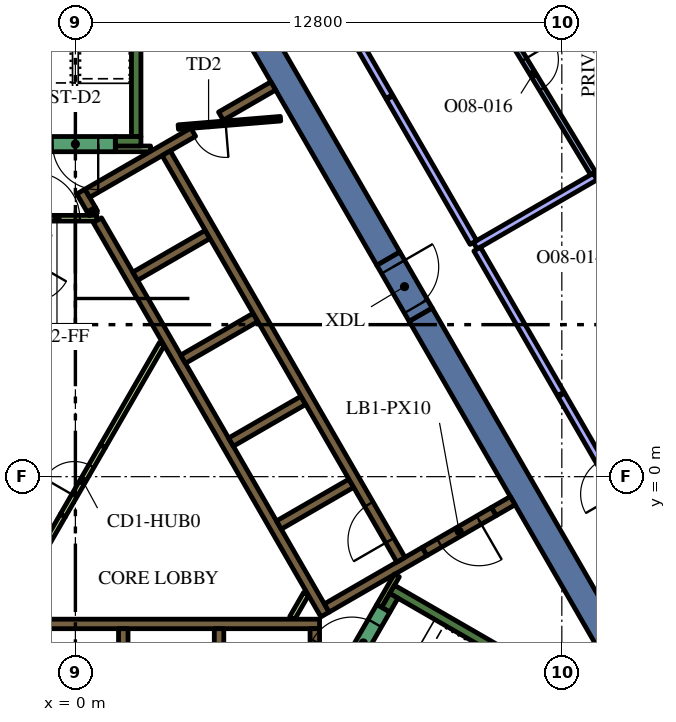
"""IFC4 building model, lengths in metres.
Left out: names, types, materials, properties, quantities, classifications, styles, units other than length and angle.
Written with IfcOpenShell. Run it as: python <this file> out.ifc"""

import sys

from ifc_helpers import new_model, si_unit, direction, frame, frame_2d, origin, place, context, subcontext, project, spatial, rectangle, extrude, element, fill, save


model = new_model("IFC4")
c1 = context("Model", 3, precision=1e-05, world=origin(), true_north=direction((0.0, 1.0)))
c2 = subcontext(c1, "Body", "Model", "MODEL_VIEW")
j1 = project(units=[si_unit("LENGTHUNIT", "METRE"), si_unit("PLANEANGLEUNIT", "RADIAN")], contexts=[c1])
p1 = place(None, origin())
s1 = spatial("IfcSite", under=j1, at=p1, CompositionType="ELEMENT")
p2 = place(p1, origin())
s2 = spatial("IfcBuilding", under=s1, at=p2, CompositionType="ELEMENT")
p3 = place(p2, frame((0.0, 0.0, 231.0)))
s3 = spatial("IfcBuildingStorey", under=s2, at=p3, CompositionType="ELEMENT", Elevation=231.0)
for number, where, z_axis, x_axis in (
    (1, (9.085, 4.264, 0.0), (0.0, 0.0, 1.0), (0.5, -0.866, 0.0)),
    (2, (8.235, 5.736, 0.0), (0.0, 0.0, 1.0), (-0.5, 0.866, 0.0)),
):
    element("IfcWall", number, at=place(p3, frame(where, z_axis=z_axis, x_axis=x_axis)), inside=s3, PredefinedType="SOLIDWALL", context=c2, shape_type="SweptSolid", body=[
        extrude(rectangle(XDim=12.472, YDim=0.7, at=frame_2d((6.236, 0.0))), origin(), (0.0, 0.0, 1.0), 4.2),
    ])
p4 = place(p3, frame((8.334, -2.964, 0.0), z_axis=(0.0, 0.0, 1.0), x_axis=(0.866016039709, -0.500016218704, 0.0)))
e3 = element("IfcWall", 3, at=p4, inside=s3, PredefinedType="SOLIDWALL", context=c2, shape_type="SweptSolid", body=[
    extrude(rectangle(XDim=7.05, YDim=0.25, at=frame_2d((3.525, 0.0))), origin(), (0.0, 0.0, 1.0), 4.2),
])
p5 = place(p3, frame((8.168, -3.503, 0.0), z_axis=(0.0, 0.0, 1.0), x_axis=(0.49972245349, 0.866185586049, 0.0)))
e4 = element("IfcWall", 4, at=p5, inside=s3, PredefinedType="SOLIDWALL", context=c2, shape_type="SweptSolid", body=[
    extrude(rectangle(XDim=0.425, YDim=0.25, at=frame_2d((0.212, 0.0))), origin(), (0.0, 0.0, 1.0), 4.2),
])
p6 = place(p3, frame((1.6, 8.95, 0.0), z_axis=(0.0, 0.0, 1.0), x_axis=(0.0, 1.0, 0.0)))
e5 = element("IfcWall", 5, at=p6, inside=s3, PredefinedType="SOLIDWALL", context=c2, shape_type="SweptSolid", body=[
    extrude(rectangle(XDim=6.8, YDim=0.25, at=frame_2d((3.4, 0.0))), origin(), (0.0, 0.0, 1.0), 4.2),
])
p7 = place(p3, frame((1.05, 8.825, 0.0), z_axis=(0.0, 0.0, 1.0), x_axis=(1.0, 0.0, 0.0)))
e6 = element("IfcWall", 6, at=p7, inside=s3, PredefinedType="SOLIDWALL", context=c2, shape_type="SweptSolid", body=[
    extrude(rectangle(XDim=0.675, YDim=0.25, at=frame_2d((0.337, 0.0))), origin(), (0.0, 0.0, 1.0), 4.2),
])
p8 = place(p3, frame((-5.545, -3.875, 0.0), z_axis=(0.0, 0.0, 1.0), x_axis=(1.0, 0.0, 0.0)))
e7 = element("IfcWall", 7, at=p8, inside=s3, PredefinedType="SOLIDWALL", context=c2, shape_type="SweptSolid", body=[
    extrude(rectangle(XDim=11.97, YDim=0.25, at=frame_2d((5.985, 0.0))), origin(), (0.0, 0.0, 1.0), 4.2),
])
p9 = place(p3, frame((6.3, -7.24, 0.0), z_axis=(0.0, 0.0, 1.0), x_axis=(0.0, 1.0, 0.0)))
e8 = element("IfcWall", 8, at=p9, inside=s3, PredefinedType="SOLIDWALL", context=c2, shape_type="SweptSolid", body=[
    extrude(rectangle(XDim=3.24, YDim=0.25, at=frame_2d((1.62, 0.0))), origin(), (0.0, 0.0, 1.0), 4.2),
])
for number, where, z_axis, x_axis in (
    (9, (3.78, -4.0, 0.0), (0.0, 0.0, 1.0), (0.0, -1.0, 0.0)),
    (10, (1.26, -4.0, 0.0), (0.0, 0.0, 1.0), (0.0, -1.0, 0.0)),
):
    element("IfcWall", number, at=place(p3, frame(where, z_axis=z_axis, x_axis=x_axis)), inside=s3, PredefinedType="SOLIDWALL", context=c2, shape_type="SweptSolid", body=[
        extrude(rectangle(XDim=2.2, YDim=0.25, at=frame_2d((1.1, 0.0))), origin(), (0.0, 0.0, 1.0), 4.2),
    ])
p10 = place(p3, frame((11.507, -0.631, 0.0), z_axis=(0.0, 0.0, 1.0), x_axis=(-0.866093731455, -0.499881634324, 0.0)))
e11 = element("IfcWall", 11, at=p10, inside=s3, PredefinedType="SOLIDWALL", context=c2, shape_type="SweptSolid", body=[
    extrude(rectangle(XDim=0.575, YDim=0.25, at=frame_2d((0.288, 0.0))), origin(), (0.0, 0.0, 1.0), 4.2),
])
p11 = place(p3, frame((0.473, 6.93, 0.0), z_axis=(0.0, 0.0, 1.0), x_axis=(-0.49972245349, 0.866185586049, 0.0)))
e12 = element("IfcWall", 12, at=p11, inside=s3, PredefinedType="SOLIDWALL", context=c2, shape_type="SweptSolid", body=[
    extrude(rectangle(XDim=0.11, YDim=0.25, at=frame_2d((0.055, 0.0))), origin(), (0.0, 0.0, 1.0), 4.2),
])
p12 = place(p3, frame((6.568, -3.627, 0.0), z_axis=(0.0, 0.0, 1.0), x_axis=(-0.499999455981, 0.866025717874, 0.0)))
e13 = element("IfcWall", 13, at=p12, inside=s3, PredefinedType="SOLIDWALL", context=c2, shape_type="SweptSolid", body=[
    extrude(rectangle(XDim=11.978, YDim=0.25, at=frame_2d((5.989, 0.0))), origin(), (0.0, 0.0, 1.0), 4.2),
])
p13 = place(p3, frame((0.417, 7.027, 0.0), z_axis=(0.0, 0.0, 1.0), x_axis=(-0.500210807569, 0.865903659763, 0.0)))
e14 = element("IfcWall", 14, at=p13, inside=s3, PredefinedType="SOLIDWALL", context=c2, shape_type="SweptSolid", body=[
    extrude(rectangle(XDim=0.548, YDim=0.25, at=frame_2d((0.274, 0.0))), origin(), (0.0, 0.0, 1.0), 4.2),
])
p14 = place(p3, frame((3.1, 9.064, 0.0), z_axis=(0.0, 0.0, 1.0), x_axis=(-0.866030133475, -0.499991807846, 0.0)))
e15 = element("IfcWall", 15, at=p14, inside=s3, PredefinedType="SOLIDWALL", context=c2, shape_type="SweptSolid", body=[
    extrude(rectangle(XDim=3.217, YDim=0.25, at=frame_2d((1.608, 0.0))), origin(), (0.0, 0.0, 1.0), 4.2),
])
p15 = place(p3, frame((1.574, 5.274, 0.0), z_axis=(0.0, 0.0, 1.0), x_axis=(0.866028486751, 0.499994660107, 0.0)))
e16 = element("IfcWall", 16, at=p15, inside=s3, PredefinedType="SOLIDWALL", context=c2, shape_type="SweptSolid", body=[
    extrude(rectangle(XDim=2.2, YDim=0.25, at=frame_2d((1.1, 0.0))), origin(), (0.0, 0.0, 1.0), 4.2),
])
for number, where, z_axis, x_axis in (
    (17, (2.834, 3.091, 0.0), (0.0, 0.0, 1.0), (0.866, 0.5, 0.0)),
    (18, (4.094, 0.909, 0.0), (0.0, 0.0, 1.0), (0.866, 0.5, 0.0)),
    (19, (5.354, -1.274, 0.0), (0.0, 0.0, 1.0), (0.866, 0.5, 0.0)),
):
    element("IfcWall", number, at=place(p3, frame(where, z_axis=z_axis, x_axis=x_axis)), inside=s3, PredefinedType="SOLIDWALL", context=c2, shape_type="SweptSolid", body=[
        extrude(rectangle(XDim=2.2, YDim=0.25, at=frame_2d((1.1, 0.0))), origin(), (0.0, 0.0, 1.0), 4.2),
    ])
p16 = place(p3, frame((6.614, -3.456, 0.0), z_axis=(0.0, 0.0, 1.0), x_axis=(0.866032512851, 0.499987686533, 0.0)))
e20 = element("IfcWall", 20, at=p16, inside=s3, PredefinedType="SOLIDWALL", context=c2, shape_type="SweptSolid", body=[
    extrude(rectangle(XDim=2.975, YDim=0.25, at=frame_2d((1.487, 0.0))), origin(), (0.0, 0.0, 1.0), 4.2),
])
p17 = place(p3, frame((3.83, 9.486, 0.0), z_axis=(0.0, 0.0, 1.0), x_axis=(0.865986202621, 0.500067892261, 0.0)))
e21 = element("IfcWall", 21, at=p17, inside=s3, PredefinedType="SOLIDWALL", context=c2, shape_type="SweptSolid", body=[
    extrude(rectangle(XDim=1.591, YDim=0.25, at=frame_2d((0.795, 0.0))), origin(), (0.0, 0.0, 1.0), 4.2),
])
p18 = place(p3, frame((1.05, 8.625, 0.0), z_axis=(0.0, 0.0, 1.0), x_axis=(1.0, 0.0, 0.0)))
e22 = element("IfcWall", 22, at=p18, inside=s3, PredefinedType="PARTITIONING", context=c2, shape_type="SweptSolid", body=[
    extrude(rectangle(XDim=0.929, YDim=0.15, at=frame_2d((0.464, 0.0))), origin(), (0.0, 0.0, 1.0), 3.45),
])
p19 = place(p3, frame((8.459, -2.599, 0.0), z_axis=(0.0, 0.0, 1.0), x_axis=(-0.500041054325, -0.866001699761, 0.0)))
e23 = element("IfcWall", 23, at=p19, inside=s3, PredefinedType="PARTITIONING", context=c2, shape_type="SweptSolid", body=[
    extrude(rectangle(XDim=0.929, YDim=0.15, at=frame_2d((0.464, 0.0))), origin(), (0.0, 0.0, 1.0), 4.2),
])
p20 = place(p3, frame((5.705, -3.718, 0.0), z_axis=(0.0, 0.0, 1.0), x_axis=(0.499962090823, 0.866047289552, 0.0)))
e24 = element("IfcWall", 24, at=p20, inside=s3, PredefinedType="PARTITIONING", context=c2, shape_type="SweptSolid", body=[
    extrude(rectangle(XDim=0.735, YDim=0.15, at=frame_2d((0.367, 0.0))), origin(), (0.0, 0.0, 1.0), 3.45),
])
p21 = place(p3, frame((-1.887, -3.718, 0.0), z_axis=(0.0, 0.0, 1.0), x_axis=(0.500043732237, 0.866000153493, 0.0)))
e25 = element("IfcWall", 25, at=p21, inside=s3, PredefinedType="PARTITIONING", context=c2, shape_type="SweptSolid", body=[
    extrude(rectangle(XDim=3.114, YDim=0.15, at=frame_2d((1.557, 0.0))), origin(), (0.0, 0.0, 1.0), 3.45),
])
p22 = place(p3, frame((0.72, 0.797, 0.0), z_axis=(0.0, 0.0, 1.0), x_axis=(0.499984921984, 0.866034108906, 0.0)))
e26 = element("IfcWall", 26, at=p22, inside=s3, PredefinedType="PARTITIONING", context=c2, shape_type="SweptSolid", body=[
    extrude(rectangle(XDim=3.113, YDim=0.15, at=frame_2d((1.557, 0.0))), origin(), (0.0, 0.0, 1.0), 3.45),
])
p23 = place(p3, frame((8.565, -2.185, 0.0), z_axis=(0.0, 0.0, 1.0), x_axis=(-0.499997954832, 0.866026584559, 0.0)))
e27 = element("IfcWall", 27, at=p23, inside=s3, PredefinedType="SOLIDWALL", context=c2, shape_type="SweptSolid", body=[
    extrude(rectangle(XDim=12.35, YDim=0.25, at=frame_2d((6.175, 0.0))), origin(), (0.0, 0.0, 1.0), 4.2),
])
p24 = place(p23, frame((0.585, 0.0, 0.0)))
e28 = element("IfcOpeningElement", 28, at=p24, cuts=e27, PredefinedType="OPENING", context=c2, shape_type="SweptSolid", body=[
    extrude(rectangle(XDim=1.1, YDim=2.1, at=frame_2d((0.55, 1.05))), frame((0.0, 0.135, 0.0), z_axis=(0.0, -1.0, 0.0), x_axis=(1.0, 0.0, 0.0)), (0.0, 0.0, 1.0), 0.27),
])
p25 = place(p3, frame((7.053, -5.284, 0.0), z_axis=(0.0, 0.0, 1.0), x_axis=(0.500078061341, 0.865980330357, 0.0)))
e29 = element("IfcWall", 29, at=p25, inside=s3, PredefinedType="SOLIDWALL", context=c2, shape_type="SweptSolid", body=[
    extrude(rectangle(XDim=2.1, YDim=0.4, at=frame_2d((1.05, 0.0))), origin(), (0.0, 0.0, 1.0), 4.2),
])
p26 = place(p25, frame((0.45, 0.0, 0.0)))
e30 = element("IfcOpeningElement", 30, at=p26, cuts=e29, PredefinedType="OPENING", context=c2, shape_type="SweptSolid", body=[
    extrude(rectangle(XDim=1.2, YDim=2.1, at=frame_2d((0.6, 1.05))), frame((0.0, 0.21, 0.0), z_axis=(0.0, -1.0, 0.0), x_axis=(1.0, 0.0, 0.0)), (0.0, 0.0, 1.0), 0.42),
])
p27 = place(p3, frame((1.05, 8.75, 0.0), z_axis=(0.0, 0.0, 1.0), x_axis=(-1.0, 0.0, 0.0)))
e31 = element("IfcWall", 31, at=p27, inside=s3, PredefinedType="SOLIDWALL", context=c2, shape_type="SweptSolid", body=[
    extrude(rectangle(XDim=2.1, YDim=0.4, at=frame_2d((1.05, 0.0))), origin(), (0.0, 0.0, 1.0), 4.2),
])
p28 = place(p27, frame((0.45, 0.0, 0.0)))
e32 = element("IfcOpeningElement", 32, at=p28, cuts=e31, PredefinedType="OPENING", context=c2, shape_type="SweptSolid", body=[
    extrude(rectangle(XDim=1.2, YDim=2.1, at=frame_2d((0.6, 1.05))), frame((0.0, 0.21, 0.0), z_axis=(0.0, -1.0, 0.0), x_axis=(1.0, 0.0, 0.0)), (0.0, 0.0, 1.0), 0.42),
])
p29 = place(p3, frame((5.398, 9.419, 0.0), z_axis=(0.0, 0.0, 1.0), x_axis=(-0.996653416376, -0.081743303248, 0.0)))
e33 = element("IfcWall", 33, at=p29, inside=s3, PredefinedType="PARTITIONING", context=c2, shape_type="SweptSolid", body=[
    extrude(rectangle(XDim=2.7, YDim=0.12, at=frame_2d((1.35, 0.0))), origin(), (0.0, 0.0, 1.0), 3.45),
])
p30 = place(p29, frame((1.45, 0.0, 0.0)))
e34 = element("IfcOpeningElement", 34, at=p30, cuts=e33, PredefinedType="OPENING", context=c2, shape_type="SweptSolid", body=[
    extrude(rectangle(XDim=0.9, YDim=2.1, at=frame_2d((0.45, 1.05))), frame((0.0, 0.07, 0.0), z_axis=(0.0, -1.0, 0.0), x_axis=(1.0, 0.0, 0.0)), (0.0, 0.0, 1.0), 0.14),
])
p31 = place(p3, frame((-0.33, -1.022, 0.0), z_axis=(0.0, 0.0, 1.0), x_axis=(0.500027713859, 0.866009402589, 0.0)))
e35 = element("IfcWall", 35, at=p31, inside=s3, PredefinedType="PARTITIONING", context=c2, shape_type="SweptSolid", body=[
    extrude(rectangle(XDim=2.1, YDim=0.15, at=frame_2d((1.05, 0.0))), origin(), (0.0, 0.0, 1.0), 3.45),
])
p32 = place(p31, frame((0.6, 0.0, 0.0)))
e36 = element("IfcOpeningElement", 36, at=p32, cuts=e35, PredefinedType="OPENING", context=c2, shape_type="SweptSolid", body=[
    extrude(rectangle(XDim=0.9, YDim=2.1, at=frame_2d((0.45, 1.05))), frame((0.0, 0.085, 0.0), z_axis=(0.0, -1.0, 0.0), x_axis=(1.0, 0.0, 0.0)), (0.0, 0.0, 1.0), 0.17),
])
p33 = place(p3, frame((-1.534, 6.8, 0.0), z_axis=(0.0, 0.0, 1.0), x_axis=(1.0, 0.0, 0.0)))
e37 = element("IfcWall", 37, at=p33, inside=s3, PredefinedType="PARTITIONING", context=c2, shape_type="SweptSolid", body=[
    extrude(rectangle(XDim=2.1, YDim=0.15, at=frame_2d((1.05, 0.0))), origin(), (0.0, 0.0, 1.0), 3.45),
])
p34 = place(p33, frame((0.45, 0.0, 0.0)))
e38 = element("IfcOpeningElement", 38, at=p34, cuts=e37, PredefinedType="OPENING", context=c2, shape_type="SweptSolid", body=[
    extrude(rectangle(XDim=1.2, YDim=2.1, at=frame_2d((0.6, 1.05))), frame((0.0, 0.085, 0.0), z_axis=(0.0, -1.0, 0.0), x_axis=(1.0, 0.0, 0.0)), (0.0, 0.0, 1.0), 0.17),
])
p35 = place(p3, frame((11.009, -0.919, 0.0), z_axis=(0.0, 0.0, 1.0), x_axis=(-0.866059744384, -0.49994051562, 0.0)))
e39 = element("IfcWall", 39, at=p35, inside=s3, PredefinedType="SOLIDWALL", context=c2, shape_type="SweptSolid", body=[
    extrude(rectangle(XDim=2.1, YDim=0.25, at=frame_2d((1.05, 0.0))), origin(), (0.0, 0.0, 1.0), 4.2),
])
p36 = place(p35, frame((0.45, 0.0, 0.0)))
e40 = element("IfcOpeningElement", 40, at=p36, cuts=e39, PredefinedType="OPENING", context=c2, shape_type="SweptSolid", body=[
    extrude(rectangle(XDim=1.2, YDim=2.1, at=frame_2d((0.6, 1.05))), frame((0.0, 0.135, 0.0), z_axis=(0.0, -1.0, 0.0), x_axis=(1.0, 0.0, 0.0)), (0.0, 0.0, 1.0), 0.27),
])
p37 = place(p3, frame((8.235, 5.736, 0.0), z_axis=(0.0, 0.0, 1.0), x_axis=(0.499954529098, -0.86605165483, 0.0)))
e41 = element("IfcWall", 41, at=p37, inside=s3, PredefinedType="SOLIDWALL", context=c2, shape_type="SweptSolid", body=[
    extrude(rectangle(XDim=1.7, YDim=0.7, at=frame_2d((0.85, 0.0))), origin(), (0.0, 0.0, 1.0), 4.2),
])
p38 = place(p37, frame((0.25, 0.0, 0.0)))
e42 = element("IfcOpeningElement", 42, at=p38, cuts=e41, PredefinedType="OPENING", context=c2, shape_type="SweptSolid", body=[
    extrude(rectangle(XDim=1.2, YDim=2.1, at=frame_2d((0.6, 1.05))), frame((0.0, 0.36, 0.0), z_axis=(0.0, -1.0, 0.0), x_axis=(1.0, 0.0, 0.0)), (0.0, 0.0, 1.0), 0.72),
])
p39 = place(p3, frame((10.522, 6.075, 0.0), z_axis=(0.0, 0.0, 1.0), x_axis=(0.866003708037, 0.500037576254, 0.0)))
e43 = element("IfcWall", 43, at=p39, inside=s3, PredefinedType="PARTITIONING", context=c2, shape_type="SweptSolid", body=[
    extrude(rectangle(XDim=3.644, YDim=0.2, at=frame_2d((1.822, 0.0))), origin(), (0.0, 0.0, 1.0), 3.45),
])
p40 = place(p3, frame((12.772, 2.178, 0.0), z_axis=(0.0, 0.0, 1.0), x_axis=(-0.50001224981, 0.866018331238, 0.0)))
e44 = element("IfcWall", 44, at=p40, inside=s3, PredefinedType="PARTITIONING", context=c2, shape_type="SweptSolid", body=[
    extrude(rectangle(XDim=4.4, YDim=0.2, at=frame_2d((2.2, 0.0))), origin(), (0.0, 0.0, 1.0), 3.45),
])
p41 = place(p3, frame((15.295, -2.191, 0.0), z_axis=(0.0, 0.0, 1.0), x_axis=(-0.500039923732, 0.86600235258, 0.0)))
e45 = element("IfcWall", 45, at=p41, inside=s3, PredefinedType="PARTITIONING", context=c2, shape_type="SweptSolid", body=[
    extrude(rectangle(XDim=5.015, YDim=0.2, at=frame_2d((2.507, 0.0))), origin(), (0.0, 0.0, 1.0), 3.45),
])
p42 = place(p41, frame((2.0, 0.0, 0.0)))
e46 = element("IfcOpeningElement", 46, at=p42, cuts=e45, PredefinedType="OPENING", context=c2, shape_type="SweptSolid", body=[
    extrude(rectangle(XDim=1.0, YDim=2.1, at=frame_2d((0.5, 1.05))), frame((0.0, 0.11, 0.0), z_axis=(0.0, -1.0, 0.0), x_axis=(1.0, 0.0, 0.0)), (0.0, 0.0, 1.0), 0.22),
])
p43 = place(p3, frame((10.439, 13.24, 0.0), z_axis=(0.0, 0.0, 1.0), x_axis=(0.517837859082, -0.855478785068, 0.0)))
e47 = element("IfcWall", 47, at=p43, inside=s3, PredefinedType="PARTITIONING", context=c2, shape_type="SweptSolid", body=[
    extrude(rectangle(XDim=6.148, YDim=0.15, at=frame_2d((3.074, 0.0))), origin(), (0.0, 0.0, 1.0), 3.45),
])
p44 = place(p43, frame((2.648, 0.0, 0.0)))
e48 = element("IfcOpeningElement", 48, at=p44, cuts=e47, PredefinedType="OPENING", context=c2, shape_type="SweptSolid", body=[
    extrude(rectangle(XDim=0.9, YDim=2.1, at=frame_2d((0.45, 1.05))), frame((0.0, 0.085, 0.0), z_axis=(0.0, -1.0, 0.0), x_axis=(1.0, 0.0, 0.0)), (0.0, 0.0, 1.0), 0.17),
])
p45 = place(p3, frame((10.472, 6.162, 0.0), z_axis=(0.0, 0.0, 1.0), x_axis=(-0.499988222896, 0.866032203192, 0.0)))
e49 = element("IfcWall", 49, at=p45, inside=s3, PredefinedType="PARTITIONING", context=c2, shape_type="SweptSolid", body=[
    extrude(rectangle(XDim=4.4, YDim=0.2, at=frame_2d((2.2, 0.0))), origin(), (0.0, 0.0, 1.0), 3.45),
])
p46 = place(p3, frame((8.257, 9.998, 0.0), z_axis=(0.0, 0.0, 1.0), x_axis=(-0.499987955211, 0.866032357735, 0.0)))
e50 = element("IfcWall", 50, at=p46, inside=s3, PredefinedType="PARTITIONING", context=c2, shape_type="SweptSolid", body=[
    extrude(rectangle(XDim=9.817, YDim=0.2, at=frame_2d((4.909, 0.0))), origin(), (0.0, 0.0, 1.0), 3.45),
])
p47 = place(p46, frame((4.4, 0.0, 0.0)))
e51 = element("IfcOpeningElement", 51, at=p47, cuts=e50, PredefinedType="OPENING", context=c2, shape_type="SweptSolid", body=[
    extrude(rectangle(XDim=1.0, YDim=2.1, at=frame_2d((0.5, 1.05))), frame((0.0, 0.11, 0.0), z_axis=(0.0, -1.0, 0.0), x_axis=(1.0, 0.0, 0.0)), (0.0, 0.0, 1.0), 0.22),
])
p48 = place(p24, origin())
e52 = element("IfcDoor", 52, at=p48, inside=s3, OperationType="DOUBLE_DOOR_SLIDING", PredefinedType="DOOR", context=c2, shape_type="SweptSolid", body=[
    extrude(rectangle(XDim=1.1, YDim=2.1, at=frame_2d((0.55, 1.05))), frame((0.0, 0.025, 0.0), z_axis=(0.0, -1.0, 0.0), x_axis=(1.0, 0.0, 0.0)), (0.0, 0.0, 1.0), 0.05),
])
fill(e28, e52)
p49 = place(p26, origin())
e53 = element("IfcDoor", 53, at=p49, inside=s3, OperationType="SINGLE_SWING_LEFT", PredefinedType="DOOR", context=c2, shape_type="SweptSolid", body=[
    extrude(rectangle(XDim=1.2, YDim=2.1, at=frame_2d((0.6, 1.05))), frame((0.0, 0.025, 0.0), z_axis=(0.0, -1.0, 0.0), x_axis=(1.0, 0.0, 0.0)), (0.0, 0.0, 1.0), 0.05),
])
fill(e30, e53)
p50 = place(p28, origin())
e54 = element("IfcDoor", 54, at=p50, inside=s3, OperationType="SINGLE_SWING_LEFT", PredefinedType="DOOR", context=c2, shape_type="SweptSolid", body=[
    extrude(rectangle(XDim=1.2, YDim=2.1, at=frame_2d((0.6, 1.05))), frame((0.0, 0.025, 0.0), z_axis=(0.0, -1.0, 0.0), x_axis=(1.0, 0.0, 0.0)), (0.0, 0.0, 1.0), 0.05),
])
fill(e32, e54)
p51 = place(p30, origin())
e55 = element("IfcDoor", 55, at=p51, inside=s3, OperationType="SINGLE_SWING_LEFT", PredefinedType="DOOR", context=c2, shape_type="SweptSolid", body=[
    extrude(rectangle(XDim=0.9, YDim=2.1, at=frame_2d((0.45, 1.05))), frame((0.0, 0.025, 0.0), z_axis=(0.0, -1.0, 0.0), x_axis=(1.0, 0.0, 0.0)), (0.0, 0.0, 1.0), 0.05),
])
fill(e34, e55)
p52 = place(p32, origin())
e56 = element("IfcDoor", 56, at=p52, inside=s3, OperationType="SINGLE_SWING_LEFT", PredefinedType="DOOR", context=c2, shape_type="SweptSolid", body=[
    extrude(rectangle(XDim=0.9, YDim=2.1, at=frame_2d((0.45, 1.05))), frame((0.0, 0.025, 0.0), z_axis=(0.0, -1.0, 0.0), x_axis=(1.0, 0.0, 0.0)), (0.0, 0.0, 1.0), 0.05),
])
fill(e36, e56)
p53 = place(p34, origin())
e57 = element("IfcDoor", 57, at=p53, inside=s3, OperationType="SINGLE_SWING_LEFT", PredefinedType="DOOR", context=c2, shape_type="SweptSolid", body=[
    extrude(rectangle(XDim=1.2, YDim=2.1, at=frame_2d((0.6, 1.05))), frame((0.0, 0.025, 0.0), z_axis=(0.0, -1.0, 0.0), x_axis=(1.0, 0.0, 0.0)), (0.0, 0.0, 1.0), 0.05),
])
fill(e38, e57)
p54 = place(p36, origin())
e58 = element("IfcDoor", 58, at=p54, inside=s3, OperationType="SINGLE_SWING_LEFT", PredefinedType="DOOR", context=c2, shape_type="SweptSolid", body=[
    extrude(rectangle(XDim=1.2, YDim=2.1, at=frame_2d((0.6, 1.05))), frame((0.0, 0.025, 0.0), z_axis=(0.0, -1.0, 0.0), x_axis=(1.0, 0.0, 0.0)), (0.0, 0.0, 1.0), 0.05),
])
fill(e40, e58)
p55 = place(p38, origin())
e59 = element("IfcDoor", 59, at=p55, inside=s3, OperationType="SINGLE_SWING_LEFT", PredefinedType="DOOR", context=c2, shape_type="SweptSolid", body=[
    extrude(rectangle(XDim=1.2, YDim=2.1, at=frame_2d((0.6, 1.05))), frame((0.0, 0.025, 0.0), z_axis=(0.0, -1.0, 0.0), x_axis=(1.0, 0.0, 0.0)), (0.0, 0.0, 1.0), 0.05),
])
fill(e42, e59)
p56 = place(p44, origin())
e60 = element("IfcDoor", 60, at=p56, inside=s3, OperationType="SINGLE_SWING_RIGHT", PredefinedType="DOOR", context=c2, shape_type="SweptSolid", body=[
    extrude(rectangle(XDim=0.9, YDim=2.1, at=frame_2d((0.45, 1.05))), frame((0.0, 0.025, 0.0), z_axis=(0.0, -1.0, 0.0), x_axis=(1.0, 0.0, 0.0)), (0.0, 0.0, 1.0), 0.05),
])
fill(e48, e60)
save(model, sys.argv[1])
